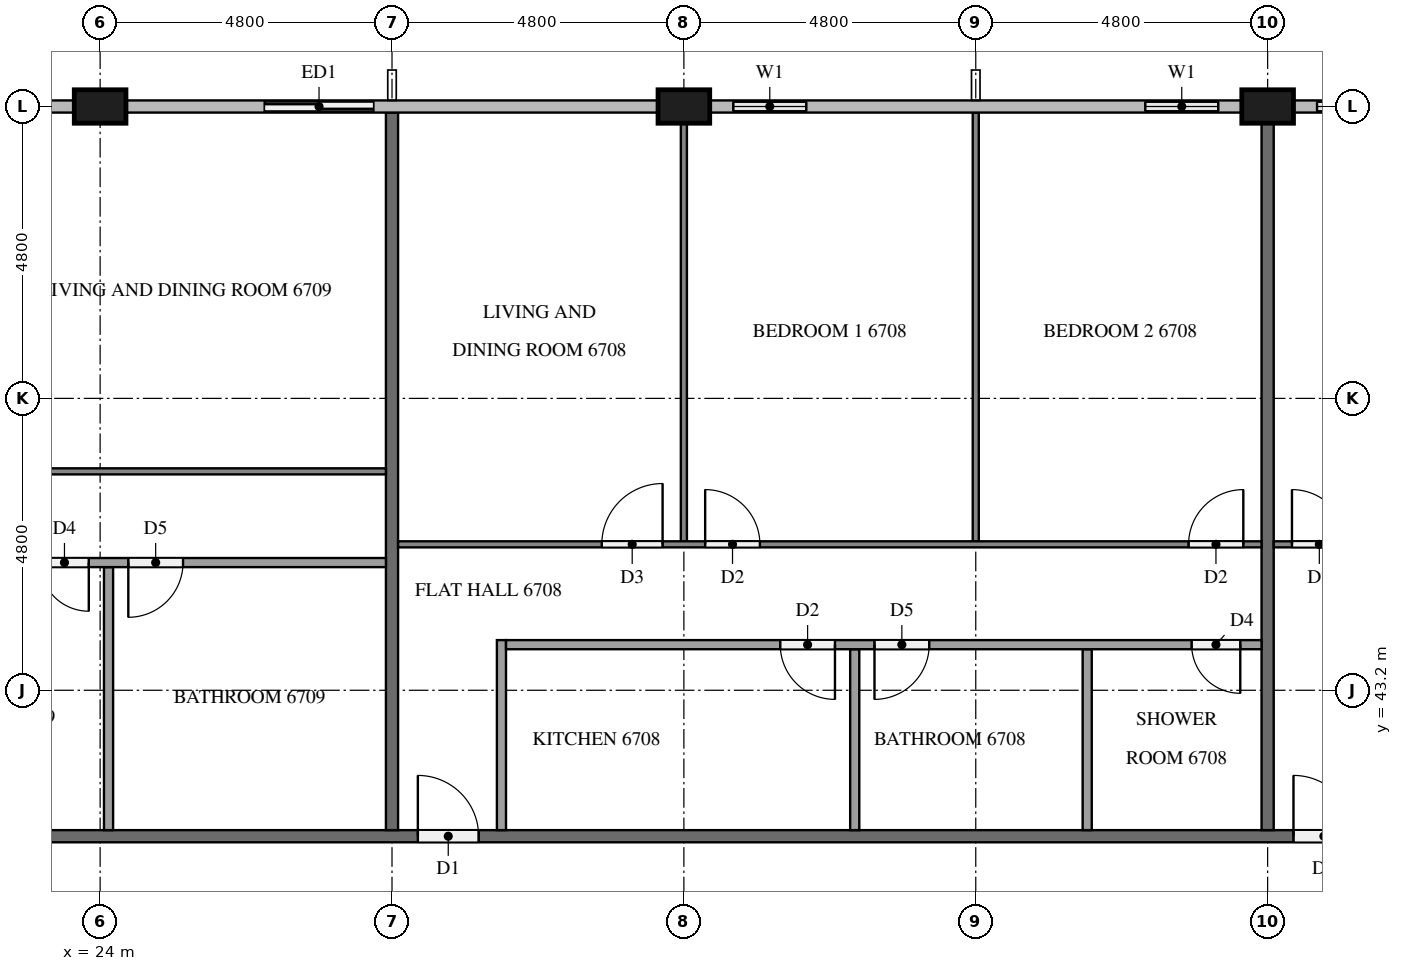
"""IFC4 building model, lengths in metres.
Left out: names, types, materials, properties, quantities, classifications, styles, units other than length and angle.
Written with IfcOpenShell. Run it as: python <this file> out.ifc"""

import sys

from ifc_helpers import new_model, si_unit, direction, frame, frame_2d, origin, origin_2d, place, context, subcontext, project, spatial, rectangle, extrude, element, fill, save


model = new_model("IFC4")
c1 = context("Model", 3, precision=1e-05, world=origin(), true_north=direction((0.0, 1.0)))
c2 = subcontext(c1, "Body", "Model", "MODEL_VIEW")
j1 = project(units=[si_unit("LENGTHUNIT", "METRE"), si_unit("PLANEANGLEUNIT", "RADIAN")], contexts=[c1])
p1 = place(None, origin())
s1 = spatial("IfcSite", under=j1, at=p1, CompositionType="ELEMENT")
p2 = place(p1, origin())
s2 = spatial("IfcBuilding", under=s1, at=p2, CompositionType="ELEMENT")
p3 = place(p2, frame((0.0, 0.0, 256.2)))
s3 = spatial("IfcBuildingStorey", under=s2, at=p3, CompositionType="ELEMENT", Elevation=256.2)
for number, where, z_axis, x_axis in (
    (1, (43.2, 52.8, 0.0), (0.0, 0.0, 1.0), (1.0, 0.0, 0.0)),
    (2, (33.6, 52.8, 0.0), (0.0, 0.0, 1.0), (1.0, 0.0, 0.0)),
    (3, (24.0, 52.8, 0.0), (0.0, 0.0, 1.0), (1.0, 0.0, 0.0)),
):
    element("IfcColumn", number, at=place(p3, frame(where, z_axis=z_axis, x_axis=x_axis)), inside=s3, PredefinedType="COLUMN", context=c2, shape_type="SweptSolid", body=[
        extrude(rectangle(XDim=0.85, YDim=0.55, at=origin_2d()), origin(), (0.0, 0.0, 1.0), 3.2),
    ])
p4 = place(p3, frame((45.6, 52.8, 0.0), z_axis=(0.0, 0.0, 1.0), x_axis=(-1.0, 0.0, 0.0)))
e4 = element("IfcWall", 4, at=p4, inside=s3, PredefinedType="SOLIDWALL", context=c2, shape_type="SweptSolid", body=[
    extrude(rectangle(XDim=1.975, YDim=0.15, at=frame_2d((0.988, 0.0))), origin(), (0.0, 0.0, 1.0), 3.2),
])
p5 = place(p4, frame((0.387, 0.0, 0.9)))
e5 = element("IfcOpeningElement", 5, at=p5, cuts=e4, PredefinedType="OPENING", context=c2, shape_type="SweptSolid", body=[
    extrude(rectangle(XDim=1.2, YDim=1.4, at=frame_2d((0.6, 0.7))), frame((0.0, 0.085, 0.0), z_axis=(0.0, -1.0, 0.0), x_axis=(1.0, 0.0, 0.0)), (0.0, 0.0, 1.0), 0.17),
])
p6 = place(p3, frame((42.775, 52.8, 0.0), z_axis=(0.0, 0.0, 1.0), x_axis=(-1.0, 0.0, 0.0)))
e6 = element("IfcWall", 6, at=p6, inside=s3, PredefinedType="SOLIDWALL", context=c2, shape_type="SweptSolid", body=[
    extrude(rectangle(XDim=1.975, YDim=0.15, at=frame_2d((0.987, 0.0))), origin(), (0.0, 0.0, 1.0), 3.2),
])
p7 = place(p6, frame((0.387, 0.0, 0.9)))
e7 = element("IfcOpeningElement", 7, at=p7, cuts=e6, PredefinedType="OPENING", context=c2, shape_type="SweptSolid", body=[
    extrude(rectangle(XDim=1.2, YDim=1.4, at=frame_2d((0.6, 0.7))), frame((0.0, 0.085, 0.0), z_axis=(0.0, -1.0, 0.0), x_axis=(1.0, 0.0, 0.0)), (0.0, 0.0, 1.0), 0.17),
])
p8 = place(p3, frame((36.0, 52.8, 0.0), z_axis=(0.0, 0.0, 1.0), x_axis=(-1.0, 0.0, 0.0)))
e8 = element("IfcWall", 8, at=p8, inside=s3, PredefinedType="SOLIDWALL", context=c2, shape_type="SweptSolid", body=[
    extrude(rectangle(XDim=1.975, YDim=0.15, at=frame_2d((0.988, 0.0))), origin(), (0.0, 0.0, 1.0), 3.2),
])
p9 = place(p8, frame((0.387, 0.0, 0.9)))
e9 = element("IfcOpeningElement", 9, at=p9, cuts=e8, PredefinedType="OPENING", context=c2, shape_type="SweptSolid", body=[
    extrude(rectangle(XDim=1.2, YDim=1.4, at=frame_2d((0.6, 0.7))), frame((0.0, 0.085, 0.0), z_axis=(0.0, -1.0, 0.0), x_axis=(1.0, 0.0, 0.0)), (0.0, 0.0, 1.0), 0.17),
])
p10 = place(p3, frame((28.8, 52.8, 0.0), z_axis=(0.0, 0.0, 1.0), x_axis=(-1.0, 0.0, 0.0)))
e10 = element("IfcWall", 10, at=p10, inside=s3, PredefinedType="SOLIDWALL", context=c2, shape_type="SweptSolid", body=[
    extrude(rectangle(XDim=2.4, YDim=0.15, at=frame_2d((1.2, 0.0))), origin(), (0.0, 0.0, 1.0), 3.2),
])
p11 = place(p10, frame((0.3, 0.0, 0.0)))
e11 = element("IfcOpeningElement", 11, at=p11, cuts=e10, PredefinedType="OPENING", context=c2, shape_type="SweptSolid", body=[
    extrude(rectangle(XDim=1.8, YDim=2.4, at=frame_2d((0.9, 1.2))), frame((0.0, 0.085, 0.0), z_axis=(0.0, -1.0, 0.0), x_axis=(1.0, 0.0, 0.0)), (0.0, 0.0, 1.0), 0.17),
])
p12 = place(p3, frame((11.9, 40.8, 0.0), z_axis=(0.0, 0.0, 1.0), x_axis=(1.0, 0.0, 0.0)))
e12 = element("IfcWall", 12, at=p12, inside=s3, PredefinedType="PARTITIONING", context=c2, shape_type="SweptSolid", body=[
    extrude(rectangle(XDim=38.6, YDim=0.2, at=frame_2d((19.3, 0.0))), origin(), (0.0, 0.0, 1.0), 3.2),
])
p13 = place(p12, frame((31.725, 0.0, 0.0)))
e13 = element("IfcOpeningElement", 13, at=p13, cuts=e12, PredefinedType="OPENING", context=c2, shape_type="SweptSolid", body=[
    extrude(rectangle(XDim=1.0, YDim=2.1, at=frame_2d((0.5, 1.05))), frame((0.0, 0.11, 0.0), z_axis=(0.0, -1.0, 0.0), x_axis=(1.0, 0.0, 0.0)), (0.0, 0.0, 1.0), 0.22),
])
p14 = place(p12, frame((17.325, 0.0, 0.0)))
e14 = element("IfcOpeningElement", 14, at=p14, cuts=e12, PredefinedType="OPENING", context=c2, shape_type="SweptSolid", body=[
    extrude(rectangle(XDim=1.0, YDim=2.1, at=frame_2d((0.5, 1.05))), frame((0.0, 0.11, 0.0), z_axis=(0.0, -1.0, 0.0), x_axis=(1.0, 0.0, 0.0)), (0.0, 0.0, 1.0), 0.22),
])
p15 = place(p12, frame((0.525, 0.0, 0.0)))
e15 = element("IfcOpeningElement", 15, at=p15, cuts=e12, PredefinedType="OPENING", context=c2, shape_type="SweptSolid", body=[
    extrude(rectangle(XDim=1.0, YDim=2.1, at=frame_2d((0.5, 1.05))), frame((0.0, 0.11, 0.0), z_axis=(0.0, -1.0, 0.0), x_axis=(1.0, 0.0, 0.0)), (0.0, 0.0, 1.0), 0.22),
])
p16 = place(p3, frame((43.2, 52.525, 0.0), z_axis=(0.0, 0.0, 1.0), x_axis=(0.0, -1.0, 0.0)))
e16 = element("IfcWall", 16, at=p16, inside=s3, PredefinedType="PARTITIONING", context=c2, shape_type="SweptSolid", body=[
    extrude(rectangle(XDim=11.625, YDim=0.2, at=frame_2d((5.812, 0.0))), origin(), (0.0, 0.0, 1.0), 3.2),
])
p17 = place(p3, frame((28.8, 52.7, 0.0), z_axis=(0.0, 0.0, 1.0), x_axis=(0.0, -1.0, 0.0)))
e17 = element("IfcWall", 17, at=p17, inside=s3, PredefinedType="PARTITIONING", context=c2, shape_type="SweptSolid", body=[
    extrude(rectangle(XDim=11.8, YDim=0.2, at=frame_2d((5.9, 0.0))), origin(), (0.0, 0.0, 1.0), 3.2),
])
p18 = place(p3, frame((43.3, 45.6, 0.0), z_axis=(0.0, 0.0, 1.0), x_axis=(1.0, 0.0, 0.0)))
e18 = element("IfcWall", 18, at=p18, inside=s3, PredefinedType="PARTITIONING", context=c2, shape_type="SweptSolid", body=[
    extrude(rectangle(XDim=14.2, YDim=0.1, at=frame_2d((7.1, 0.0))), origin(), (0.0, 0.0, 1.0), 3.2),
])
p19 = place(p18, frame((0.3, 0.0, 0.0)))
e19 = element("IfcOpeningElement", 19, at=p19, cuts=e18, PredefinedType="OPENING", context=c2, shape_type="SweptSolid", body=[
    extrude(rectangle(XDim=0.9, YDim=2.1, at=frame_2d((0.45, 1.05))), frame((0.0, 0.06, 0.0), z_axis=(0.0, -1.0, 0.0), x_axis=(1.0, 0.0, 0.0)), (0.0, 0.0, 1.0), 0.12),
])
p20 = place(p18, frame((8.25, 0.0, 0.0)))
e20 = element("IfcOpeningElement", 20, at=p20, cuts=e18, PredefinedType="OPENING", context=c2, shape_type="SweptSolid", body=[
    extrude(rectangle(XDim=0.9, YDim=2.1, at=frame_2d((0.45, 1.05))), frame((0.0, 0.06, 0.0), z_axis=(0.0, -1.0, 0.0), x_axis=(1.0, 0.0, 0.0)), (0.0, 0.0, 1.0), 0.12),
])
p21 = place(p18, frame((9.85, 0.0, 0.0)))
e21 = element("IfcOpeningElement", 21, at=p21, cuts=e18, PredefinedType="OPENING", context=c2, shape_type="SweptSolid", body=[
    extrude(rectangle(XDim=1.0, YDim=2.1, at=frame_2d((0.5, 1.05))), frame((0.0, 0.06, 0.0), z_axis=(0.0, -1.0, 0.0), x_axis=(1.0, 0.0, 0.0)), (0.0, 0.0, 1.0), 0.12),
])
p22 = place(p3, frame((33.6, 45.65, 0.0), z_axis=(0.0, 0.0, 1.0), x_axis=(0.0, 1.0, 0.0)))
e22 = element("IfcWall", 22, at=p22, inside=s3, PredefinedType="PARTITIONING", context=c2, shape_type="SweptSolid", body=[
    extrude(rectangle(XDim=6.875, YDim=0.1, at=frame_2d((3.438, 0.0))), origin(), (0.0, 0.0, 1.0), 3.2),
])
p23 = place(p3, frame((38.4, 45.65, 0.0), z_axis=(0.0, 0.0, 1.0), x_axis=(0.0, 1.0, 0.0)))
e23 = element("IfcWall", 23, at=p23, inside=s3, PredefinedType="PARTITIONING", context=c2, shape_type="SweptSolid", body=[
    extrude(rectangle(XDim=7.05, YDim=0.1, at=frame_2d((3.525, 0.0))), origin(), (0.0, 0.0, 1.0), 3.2),
])
p24 = place(p3, frame((28.9, 45.6, 0.0), z_axis=(0.0, 0.0, 1.0), x_axis=(1.0, 0.0, 0.0)))
e24 = element("IfcWall", 24, at=p24, inside=s3, PredefinedType="PARTITIONING", context=c2, shape_type="SweptSolid", body=[
    extrude(rectangle(XDim=14.2, YDim=0.1, at=frame_2d((7.1, 0.0))), origin(), (0.0, 0.0, 1.0), 3.2),
])
p25 = place(p24, frame((3.35, 0.0, 0.0)))
e25 = element("IfcOpeningElement", 25, at=p25, cuts=e24, PredefinedType="OPENING", context=c2, shape_type="SweptSolid", body=[
    extrude(rectangle(XDim=1.0, YDim=2.1, at=frame_2d((0.5, 1.05))), frame((0.0, 0.06, 0.0), z_axis=(0.0, -1.0, 0.0), x_axis=(1.0, 0.0, 0.0)), (0.0, 0.0, 1.0), 0.12),
])
p26 = place(p24, frame((5.05, 0.0, 0.0)))
e26 = element("IfcOpeningElement", 26, at=p26, cuts=e24, PredefinedType="OPENING", context=c2, shape_type="SweptSolid", body=[
    extrude(rectangle(XDim=0.9, YDim=2.1, at=frame_2d((0.45, 1.05))), frame((0.0, 0.06, 0.0), z_axis=(0.0, -1.0, 0.0), x_axis=(1.0, 0.0, 0.0)), (0.0, 0.0, 1.0), 0.12),
])
p27 = place(p24, frame((13.0, 0.0, 0.0)))
e27 = element("IfcOpeningElement", 27, at=p27, cuts=e24, PredefinedType="OPENING", context=c2, shape_type="SweptSolid", body=[
    extrude(rectangle(XDim=0.9, YDim=2.1, at=frame_2d((0.45, 1.05))), frame((0.0, 0.06, 0.0), z_axis=(0.0, -1.0, 0.0), x_axis=(1.0, 0.0, 0.0)), (0.0, 0.0, 1.0), 0.12),
])
for number, where, z_axis, x_axis in (
    (28, (36.41, 40.9, 0.0), (0.0, 0.0, 1.0), (0.0, 1.0, 0.0)),
    (29, (40.233, 40.9, 0.0), (0.0, 0.0, 1.0), (0.0, 1.0, 0.0)),
):
    element("IfcWall", number, at=place(p3, frame(where, z_axis=z_axis, x_axis=x_axis)), inside=s3, PredefinedType="PARTITIONING", context=c2, shape_type="SweptSolid", body=[
        extrude(rectangle(XDim=2.975, YDim=0.15, at=frame_2d((1.488, 0.0))), origin(), (0.0, 0.0, 1.0), 3.2),
    ])
p28 = place(p3, frame((30.6, 40.9, 0.0), z_axis=(0.0, 0.0, 1.0), x_axis=(0.0, 1.0, 0.0)))
e30 = element("IfcWall", 30, at=p28, inside=s3, PredefinedType="PARTITIONING", context=c2, shape_type="SweptSolid", body=[
    extrude(rectangle(XDim=3.125, YDim=0.15, at=frame_2d((1.562, 0.0))), origin(), (0.0, 0.0, 1.0), 3.2),
])
p29 = place(p3, frame((43.1, 43.95, 0.0), z_axis=(0.0, 0.0, 1.0), x_axis=(-1.0, 0.0, 0.0)))
e31 = element("IfcWall", 31, at=p29, inside=s3, PredefinedType="PARTITIONING", context=c2, shape_type="SweptSolid", body=[
    extrude(rectangle(XDim=12.425, YDim=0.15, at=frame_2d((6.212, 0.0))), origin(), (0.0, 0.0, 1.0), 3.2),
])
p30 = place(p29, frame((7.015, 0.0, 0.0)))
e32 = element("IfcOpeningElement", 32, at=p30, cuts=e31, PredefinedType="OPENING", context=c2, shape_type="SweptSolid", body=[
    extrude(rectangle(XDim=0.9, YDim=2.1, at=frame_2d((0.45, 1.05))), frame((0.0, 0.085, 0.0), z_axis=(0.0, -1.0, 0.0), x_axis=(1.0, 0.0, 0.0)), (0.0, 0.0, 1.0), 0.17),
])
p31 = place(p29, frame((5.465, 0.0, 0.0)))
e33 = element("IfcOpeningElement", 33, at=p31, cuts=e31, PredefinedType="OPENING", context=c2, shape_type="SweptSolid", body=[
    extrude(rectangle(XDim=0.9, YDim=2.1, at=frame_2d((0.45, 1.05))), frame((0.0, 0.085, 0.0), z_axis=(0.0, -1.0, 0.0), x_axis=(1.0, 0.0, 0.0)), (0.0, 0.0, 1.0), 0.17),
])
p32 = place(p29, frame((0.35, 0.0, 0.0)))
e34 = element("IfcOpeningElement", 34, at=p32, cuts=e31, PredefinedType="OPENING", context=c2, shape_type="SweptSolid", body=[
    extrude(rectangle(XDim=0.8, YDim=2.1, at=frame_2d((0.4, 1.05))), frame((0.0, 0.085, 0.0), z_axis=(0.0, -1.0, 0.0), x_axis=(1.0, 0.0, 0.0)), (0.0, 0.0, 1.0), 0.17),
])
p33 = place(p3, frame((12.1, 46.8, 0.0), z_axis=(0.0, 0.0, 1.0), x_axis=(1.0, 0.0, 0.0)))
e35 = element("IfcWall", 35, at=p33, inside=s3, PredefinedType="PARTITIONING", context=c2, shape_type="SweptSolid", body=[
    extrude(rectangle(XDim=16.6, YDim=0.1, at=frame_2d((8.3, 0.0))), origin(), (0.0, 0.0, 1.0), 3.2),
])
p34 = place(p33, frame((0.3, 0.0, 0.0)))
e36 = element("IfcOpeningElement", 36, at=p34, cuts=e35, PredefinedType="OPENING", context=c2, shape_type="SweptSolid", body=[
    extrude(rectangle(XDim=0.9, YDim=2.1, at=frame_2d((0.45, 1.05))), frame((0.0, 0.06, 0.0), z_axis=(0.0, -1.0, 0.0), x_axis=(1.0, 0.0, 0.0)), (0.0, 0.0, 1.0), 0.12),
])
p35 = place(p33, frame((8.25, 0.0, 0.0)))
e37 = element("IfcOpeningElement", 37, at=p35, cuts=e35, PredefinedType="OPENING", context=c2, shape_type="SweptSolid", body=[
    extrude(rectangle(XDim=0.9, YDim=2.1, at=frame_2d((0.45, 1.05))), frame((0.0, 0.06, 0.0), z_axis=(0.0, -1.0, 0.0), x_axis=(1.0, 0.0, 0.0)), (0.0, 0.0, 1.0), 0.12),
])
p36 = place(p33, frame((9.85, 0.0, 0.0)))
e38 = element("IfcOpeningElement", 38, at=p36, cuts=e35, PredefinedType="OPENING", context=c2, shape_type="SweptSolid", body=[
    extrude(rectangle(XDim=1.0, YDim=2.1, at=frame_2d((0.5, 1.05))), frame((0.0, 0.06, 0.0), z_axis=(0.0, -1.0, 0.0), x_axis=(1.0, 0.0, 0.0)), (0.0, 0.0, 1.0), 0.12),
])
p37 = place(p3, frame((24.138, 40.9, 0.0), z_axis=(0.0, 0.0, 1.0), x_axis=(0.0, 1.0, 0.0)))
e39 = element("IfcWall", 39, at=p37, inside=s3, PredefinedType="PARTITIONING", context=c2, shape_type="SweptSolid", body=[
    extrude(rectangle(XDim=4.325, YDim=0.15, at=frame_2d((2.163, 0.0))), origin(), (0.0, 0.0, 1.0), 3.2),
])
p38 = place(p3, frame((28.7, 45.3, 0.0), z_axis=(0.0, 0.0, 1.0), x_axis=(-1.0, 0.0, 0.0)))
e40 = element("IfcWall", 40, at=p38, inside=s3, PredefinedType="PARTITIONING", context=c2, shape_type="SweptSolid", body=[
    extrude(rectangle(XDim=14.825, YDim=0.15, at=frame_2d((7.413, 0.0))), origin(), (0.0, 0.0, 1.0), 3.2),
])
p39 = place(p38, frame((13.625, 0.0, 0.0)))
e41 = element("IfcOpeningElement", 41, at=p39, cuts=e40, PredefinedType="OPENING", context=c2, shape_type="SweptSolid", body=[
    extrude(rectangle(XDim=0.9, YDim=2.1, at=frame_2d((0.45, 1.05))), frame((0.0, 0.085, 0.0), z_axis=(0.0, -1.0, 0.0), x_axis=(1.0, 0.0, 0.0)), (0.0, 0.0, 1.0), 0.17),
])
p40 = place(p38, frame((4.886, 0.0, 0.0)))
e42 = element("IfcOpeningElement", 42, at=p40, cuts=e40, PredefinedType="OPENING", context=c2, shape_type="SweptSolid", body=[
    extrude(rectangle(XDim=0.8, YDim=2.1, at=frame_2d((0.4, 1.05))), frame((0.0, 0.085, 0.0), z_axis=(0.0, -1.0, 0.0), x_axis=(1.0, 0.0, 0.0)), (0.0, 0.0, 1.0), 0.17),
])
p41 = place(p38, frame((3.336, 0.0, 0.0)))
e43 = element("IfcOpeningElement", 43, at=p41, cuts=e40, PredefinedType="OPENING", context=c2, shape_type="SweptSolid", body=[
    extrude(rectangle(XDim=0.9, YDim=2.1, at=frame_2d((0.45, 1.05))), frame((0.0, 0.085, 0.0), z_axis=(0.0, -1.0, 0.0), x_axis=(1.0, 0.0, 0.0)), (0.0, 0.0, 1.0), 0.17),
])
p42 = place(p5, origin())
e44 = element("IfcWindow", 44, at=p42, inside=s3, PartitioningType="SINGLE_PANEL", PredefinedType="WINDOW", context=c2, shape_type="SweptSolid", body=[
    extrude(rectangle(XDim=1.2, YDim=1.4, at=frame_2d((0.6, 0.7))), frame((0.0, 0.03, 0.0), z_axis=(0.0, -1.0, 0.0), x_axis=(1.0, 0.0, 0.0)), (0.0, 0.0, 1.0), 0.06),
])
fill(e5, e44)
p43 = place(p7, origin())
e45 = element("IfcWindow", 45, at=p43, inside=s3, PartitioningType="SINGLE_PANEL", PredefinedType="WINDOW", context=c2, shape_type="SweptSolid", body=[
    extrude(rectangle(XDim=1.2, YDim=1.4, at=frame_2d((0.6, 0.7))), frame((0.0, 0.03, 0.0), z_axis=(0.0, -1.0, 0.0), x_axis=(1.0, 0.0, 0.0)), (0.0, 0.0, 1.0), 0.06),
])
fill(e7, e45)
p44 = place(p9, origin())
e46 = element("IfcWindow", 46, at=p44, inside=s3, PartitioningType="SINGLE_PANEL", PredefinedType="WINDOW", context=c2, shape_type="SweptSolid", body=[
    extrude(rectangle(XDim=1.2, YDim=1.4, at=frame_2d((0.6, 0.7))), frame((0.0, 0.03, 0.0), z_axis=(0.0, -1.0, 0.0), x_axis=(1.0, 0.0, 0.0)), (0.0, 0.0, 1.0), 0.06),
])
fill(e9, e46)
p45 = place(p11, origin())
e47 = element("IfcDoor", 47, at=p45, inside=s3, OperationType="SLIDING_TO_LEFT", PredefinedType="DOOR", context=c2, shape_type="SweptSolid", body=[
    extrude(rectangle(XDim=1.8, YDim=2.4, at=frame_2d((0.9, 1.2))), frame((0.0, 0.025, 0.0), z_axis=(0.0, -1.0, 0.0), x_axis=(1.0, 0.0, 0.0)), (0.0, 0.0, 1.0), 0.05),
])
fill(e11, e47)
p46 = place(p13, origin())
e48 = element("IfcDoor", 48, at=p46, inside=s3, OperationType="SINGLE_SWING_LEFT", PredefinedType="DOOR", context=c2, shape_type="SweptSolid", body=[
    extrude(rectangle(XDim=1.0, YDim=2.1, at=frame_2d((0.5, 1.05))), frame((0.0, 0.025, 0.0), z_axis=(0.0, -1.0, 0.0), x_axis=(1.0, 0.0, 0.0)), (0.0, 0.0, 1.0), 0.05),
])
fill(e13, e48)
p47 = place(p14, origin())
e49 = element("IfcDoor", 49, at=p47, inside=s3, OperationType="SINGLE_SWING_LEFT", PredefinedType="DOOR", context=c2, shape_type="SweptSolid", body=[
    extrude(rectangle(XDim=1.0, YDim=2.1, at=frame_2d((0.5, 1.05))), frame((0.0, 0.025, 0.0), z_axis=(0.0, -1.0, 0.0), x_axis=(1.0, 0.0, 0.0)), (0.0, 0.0, 1.0), 0.05),
])
fill(e14, e49)
p48 = place(p19, origin())
e50 = element("IfcDoor", 50, at=p48, inside=s3, OperationType="SINGLE_SWING_LEFT", PredefinedType="DOOR", context=c2, shape_type="SweptSolid", body=[
    extrude(rectangle(XDim=0.9, YDim=2.1, at=frame_2d((0.45, 1.05))), frame((0.0, 0.025, 0.0), z_axis=(0.0, -1.0, 0.0), x_axis=(1.0, 0.0, 0.0)), (0.0, 0.0, 1.0), 0.05),
])
fill(e19, e50)
p49 = place(p25, origin())
e51 = element("IfcDoor", 51, at=p49, inside=s3, OperationType="SINGLE_SWING_RIGHT", PredefinedType="DOOR", context=c2, shape_type="SweptSolid", body=[
    extrude(rectangle(XDim=1.0, YDim=2.1, at=frame_2d((0.5, 1.05))), frame((0.0, 0.025, 0.0), z_axis=(0.0, -1.0, 0.0), x_axis=(1.0, 0.0, 0.0)), (0.0, 0.0, 1.0), 0.05),
])
fill(e25, e51)
p50 = place(p26, origin())
e52 = element("IfcDoor", 52, at=p50, inside=s3, OperationType="SINGLE_SWING_LEFT", PredefinedType="DOOR", context=c2, shape_type="SweptSolid", body=[
    extrude(rectangle(XDim=0.9, YDim=2.1, at=frame_2d((0.45, 1.05))), frame((0.0, 0.025, 0.0), z_axis=(0.0, -1.0, 0.0), x_axis=(1.0, 0.0, 0.0)), (0.0, 0.0, 1.0), 0.05),
])
fill(e26, e52)
p51 = place(p27, origin())
e53 = element("IfcDoor", 53, at=p51, inside=s3, OperationType="SINGLE_SWING_RIGHT", PredefinedType="DOOR", context=c2, shape_type="SweptSolid", body=[
    extrude(rectangle(XDim=0.9, YDim=2.1, at=frame_2d((0.45, 1.05))), frame((0.0, 0.025, 0.0), z_axis=(0.0, -1.0, 0.0), x_axis=(1.0, 0.0, 0.0)), (0.0, 0.0, 1.0), 0.05),
])
fill(e27, e53)
p52 = place(p30, origin())
e54 = element("IfcDoor", 54, at=p52, inside=s3, OperationType="SINGLE_SWING_LEFT", PredefinedType="DOOR", context=c2, shape_type="SweptSolid", body=[
    extrude(rectangle(XDim=0.9, YDim=2.1, at=frame_2d((0.45, 1.05))), frame((0.0, 0.025, 0.0), z_axis=(0.0, -1.0, 0.0), x_axis=(1.0, 0.0, 0.0)), (0.0, 0.0, 1.0), 0.05),
])
fill(e32, e54)
p53 = place(p31, origin())
e55 = element("IfcDoor", 55, at=p53, inside=s3, OperationType="SINGLE_SWING_RIGHT", PredefinedType="DOOR", context=c2, shape_type="SweptSolid", body=[
    extrude(rectangle(XDim=0.9, YDim=2.1, at=frame_2d((0.45, 1.05))), frame((0.0, 0.025, 0.0), z_axis=(0.0, -1.0, 0.0), x_axis=(1.0, 0.0, 0.0)), (0.0, 0.0, 1.0), 0.05),
])
fill(e33, e55)
p54 = place(p32, origin())
e56 = element("IfcDoor", 56, at=p54, inside=s3, OperationType="SINGLE_SWING_LEFT", PredefinedType="DOOR", context=c2, shape_type="SweptSolid", body=[
    extrude(rectangle(XDim=0.8, YDim=2.1, at=frame_2d((0.4, 1.05))), frame((0.0, 0.025, 0.0), z_axis=(0.0, -1.0, 0.0), x_axis=(1.0, 0.0, 0.0)), (0.0, 0.0, 1.0), 0.05),
])
fill(e34, e56)
p55 = place(p40, origin())
e57 = element("IfcDoor", 57, at=p55, inside=s3, OperationType="SINGLE_SWING_LEFT", PredefinedType="DOOR", context=c2, shape_type="SweptSolid", body=[
    extrude(rectangle(XDim=0.8, YDim=2.1, at=frame_2d((0.4, 1.05))), frame((0.0, 0.025, 0.0), z_axis=(0.0, -1.0, 0.0), x_axis=(1.0, 0.0, 0.0)), (0.0, 0.0, 1.0), 0.05),
])
fill(e42, e57)
p56 = place(p41, origin())
e58 = element("IfcDoor", 58, at=p56, inside=s3, OperationType="SINGLE_SWING_RIGHT", PredefinedType="DOOR", context=c2, shape_type="SweptSolid", body=[
    extrude(rectangle(XDim=0.9, YDim=2.1, at=frame_2d((0.45, 1.05))), frame((0.0, 0.025, 0.0), z_axis=(0.0, -1.0, 0.0), x_axis=(1.0, 0.0, 0.0)), (0.0, 0.0, 1.0), 0.05),
])
fill(e43, e58)
save(model, sys.argv[1])
